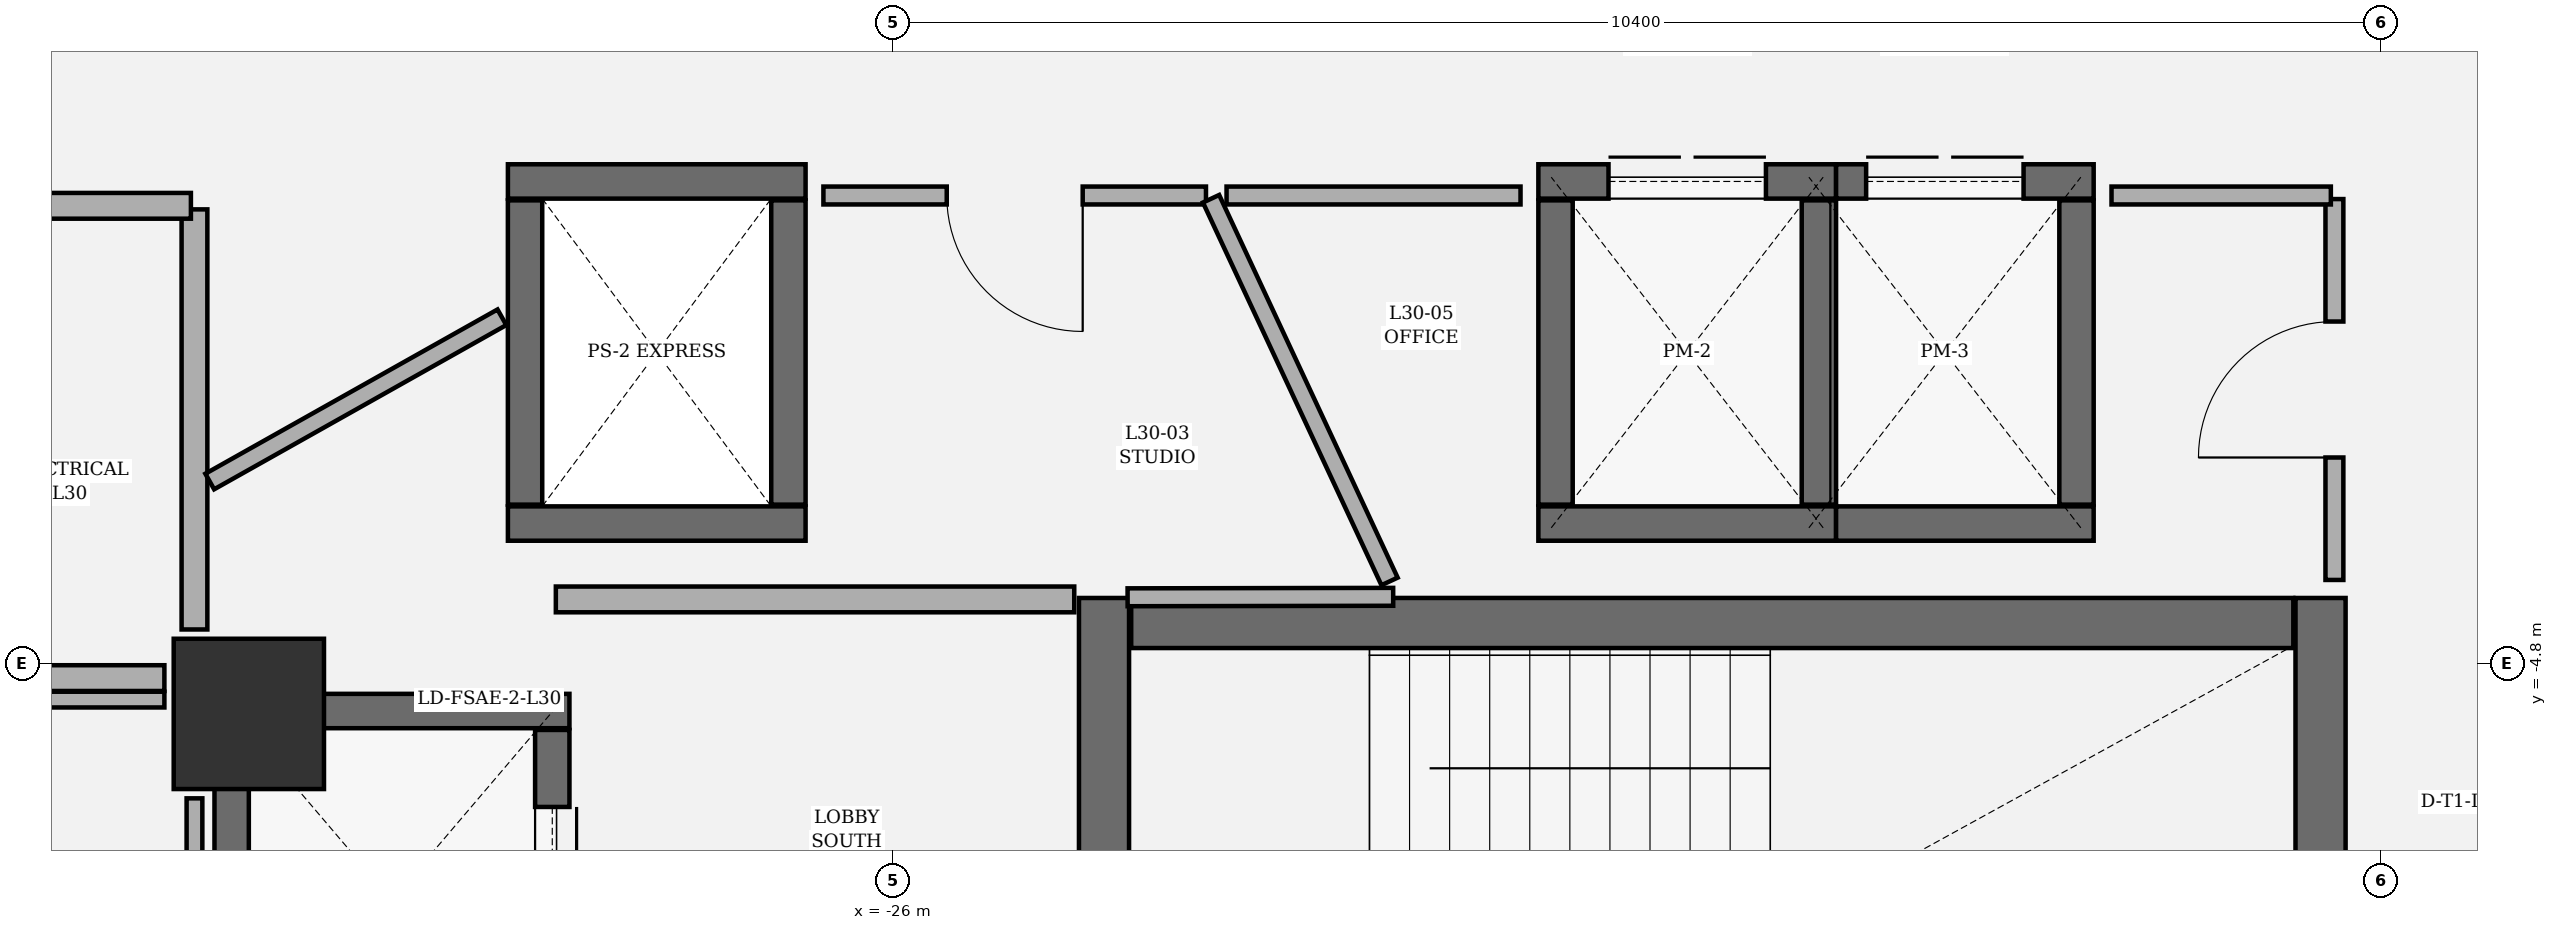
"""IFC4 building model, lengths in metres.
Left out: names, types, materials, properties, quantities, classifications, styles, units other than length and angle.
Written with IfcOpenShell. Run it as: python <this file> out.ifc"""

import sys

from ifc_helpers import new_model, si_unit, direction, frame, frame_2d, origin, origin_2d, place, context, subcontext, project, spatial, rectangle, extrude, element, fill, save


model = new_model("IFC4")
c1 = context("Model", 3, precision=1e-05, world=origin(), true_north=direction((0.0, 1.0)))
c2 = subcontext(c1, "Body", "Model", "MODEL_VIEW")
j1 = project(units=[si_unit("LENGTHUNIT", "METRE"), si_unit("PLANEANGLEUNIT", "RADIAN")], contexts=[c1])
p1 = place(None, origin())
s1 = spatial("IfcSite", under=j1, at=p1, CompositionType="ELEMENT")
p2 = place(p1, origin())
s2 = spatial("IfcBuilding", under=s1, at=p2, CompositionType="ELEMENT")
p3 = place(p2, frame((0.0, 0.0, 134.1)))
s3 = spatial("IfcBuildingStorey", under=s2, at=p3, CompositionType="ELEMENT", Elevation=134.1)
p4 = place(p3, frame((-30.5, -5.15, 0.0), z_axis=(0.0, 0.0, 1.0), x_axis=(1.0, 0.0, 0.0)))
e1 = element("IfcColumn", 1, at=p4, inside=s3, PredefinedType="COLUMN", context=c2, shape_type="SweptSolid", body=[
    extrude(rectangle(XDim=1.05, YDim=1.05, at=origin_2d()), origin(), (0.0, 0.0, 1.0), 4.05),
])
for number, where, z_axis, x_axis in (
    (2, (-24.525, -4.34, 0.0), (0.0, 0.0, 1.0), (0.0, -1.0, 0.0)),
    (3, (-16.025, -8.55, 0.0), (0.0, 0.0, 1.0), (0.0, 1.0, 0.0)),
):
    element("IfcWall", number, at=place(p3, frame(where, z_axis=z_axis, x_axis=x_axis)), inside=s3, PredefinedType="SHEAR", context=c2, shape_type="SweptSolid", body=[
        extrude(rectangle(XDim=4.21, YDim=0.35, at=frame_2d((2.105, 0.0))), origin(), (0.0, 0.0, 1.0), 3.78),
    ])
p5 = place(p3, frame((-16.215, -4.515, 0.0), z_axis=(0.0, 0.0, 1.0), x_axis=(-1.0, 0.0, 0.0)))
e4 = element("IfcWall", 4, at=p5, inside=s3, PredefinedType="SHEAR", context=c2, shape_type="SweptSolid", body=[
    extrude(rectangle(XDim=8.12, YDim=0.35, at=frame_2d((4.06, 0.0))), origin(), (0.0, 0.0, 1.0), 3.78),
])
p6 = place(p3, frame((-30.74, -5.13, 0.0), z_axis=(0.0, 0.0, 1.0), x_axis=(1.0, 0.0, 0.0)))
e5 = element("IfcWall", 5, at=p6, inside=s3, PredefinedType="SHEAR", context=c2, shape_type="SweptSolid", body=[
    extrude(rectangle(XDim=2.48, YDim=0.24, at=frame_2d((1.24, 0.0))), origin(), (0.0, 0.0, 1.0), 3.78),
])
p7 = place(p3, frame((-30.62, -7.638, 0.0), z_axis=(0.0, 0.0, 1.0), x_axis=(0.0, 1.0, 0.0)))
e6 = element("IfcWall", 6, at=p7, inside=s3, PredefinedType="SHEAR", context=c2, shape_type="SweptSolid", body=[
    extrude(rectangle(XDim=2.376, YDim=0.24, at=frame_2d((1.188, 0.0))), origin(), (0.0, 0.0, 1.0), 3.78),
])
p8 = place(p3, frame((-28.38, -5.262, 0.0), z_axis=(0.0, 0.0, 1.0), x_axis=(0.0, -1.0, 0.0)))
e7 = element("IfcWall", 7, at=p8, inside=s3, PredefinedType="SHEAR", context=c2, shape_type="SweptSolid", body=[
    extrude(rectangle(XDim=2.376, YDim=0.24, at=frame_2d((1.188, 0.0))), origin(), (0.0, 0.0, 1.0), 3.78),
])
p9 = place(p8, frame((0.538, 0.0, 0.0)))
e8 = element("IfcOpeningElement", 8, at=p9, cuts=e7, PredefinedType="OPENING", context=c2, shape_type="SweptSolid", body=[
    extrude(rectangle(XDim=1.3, YDim=2.3, at=frame_2d((0.65, 1.15))), frame((0.0, 0.13, 0.0), z_axis=(0.0, -1.0, 0.0), x_axis=(1.0, 0.0, 0.0)), (0.0, 0.0, 1.0), 0.26),
])
for number, where, z_axis, x_axis in (
    (9, (-26.61, -3.82, 0.0), (0.0, 0.0, 1.0), (-1.0, 0.0, 0.0)),
    (10, (-28.69, -1.43, 0.0), (0.0, 0.0, 1.0), (1.0, 0.0, 0.0)),
):
    element("IfcWall", number, at=place(p3, frame(where, z_axis=z_axis, x_axis=x_axis)), inside=s3, PredefinedType="SHEAR", context=c2, shape_type="SweptSolid", body=[
        extrude(rectangle(XDim=2.08, YDim=0.24, at=frame_2d((1.04, 0.0))), origin(), (0.0, 0.0, 1.0), 3.78),
    ])
for number, where, z_axis, x_axis in (
    (11, (-28.57, -3.688, 0.0), (0.0, 0.0, 1.0), (0.0, 1.0, 0.0)),
    (12, (-26.73, -1.562, 0.0), (0.0, 0.0, 1.0), (0.0, -1.0, 0.0)),
):
    element("IfcWall", number, at=place(p3, frame(where, z_axis=z_axis, x_axis=x_axis)), inside=s3, PredefinedType="SHEAR", context=c2, shape_type="SweptSolid", body=[
        extrude(rectangle(XDim=2.126, YDim=0.24, at=frame_2d((1.063, 0.0))), origin(), (0.0, 0.0, 1.0), 3.78),
    ])
p10 = place(p3, frame((-19.41, -3.82, 0.0), z_axis=(0.0, 0.0, 1.0), x_axis=(-1.0, 0.0, 0.0)))
e13 = element("IfcWall", 13, at=p10, inside=s3, PredefinedType="SHEAR", context=c2, shape_type="SweptSolid", body=[
    extrude(rectangle(XDim=2.08, YDim=0.24, at=frame_2d((1.04, 0.0))), origin(), (0.0, 0.0, 1.0), 3.78),
])
p11 = place(p3, frame((-21.49, -1.43, 0.0), z_axis=(0.0, 0.0, 1.0), x_axis=(1.0, 0.0, 0.0)))
e14 = element("IfcWall", 14, at=p11, inside=s3, PredefinedType="SHEAR", context=c2, shape_type="SweptSolid", body=[
    extrude(rectangle(XDim=2.08, YDim=0.24, at=frame_2d((1.04, 0.0))), origin(), (0.0, 0.0, 1.0), 3.78),
])
p12 = place(p11, frame((0.49, 0.0, 0.0)))
e15 = element("IfcOpeningElement", 15, at=p12, cuts=e14, PredefinedType="OPENING", context=c2, shape_type="SweptSolid", body=[
    extrude(rectangle(XDim=1.1, YDim=2.2, at=frame_2d((0.55, 1.1))), frame((0.0, 0.13, 0.0), z_axis=(0.0, -1.0, 0.0), x_axis=(1.0, 0.0, 0.0)), (0.0, 0.0, 1.0), 0.26),
])
for number, where, z_axis, x_axis in (
    (16, (-21.37, -3.688, 0.0), (0.0, 0.0, 1.0), (0.0, 1.0, 0.0)),
    (17, (-19.53, -1.562, 0.0), (0.0, 0.0, 1.0), (0.0, -1.0, 0.0)),
):
    element("IfcWall", number, at=place(p3, frame(where, z_axis=z_axis, x_axis=x_axis)), inside=s3, PredefinedType="SHEAR", context=c2, shape_type="SweptSolid", body=[
        extrude(rectangle(XDim=2.126, YDim=0.24, at=frame_2d((1.063, 0.0))), origin(), (0.0, 0.0, 1.0), 3.78),
    ])
p13 = place(p3, frame((-17.61, -3.82, 0.0), z_axis=(0.0, 0.0, 1.0), x_axis=(-1.0, 0.0, 0.0)))
e18 = element("IfcWall", 18, at=p13, inside=s3, PredefinedType="SHEAR", context=c2, shape_type="SweptSolid", body=[
    extrude(rectangle(XDim=1.8, YDim=0.24, at=frame_2d((0.9, 0.0))), origin(), (0.0, 0.0, 1.0), 3.78),
])
p14 = place(p3, frame((-19.41, -1.43, 0.0), z_axis=(0.0, 0.0, 1.0), x_axis=(1.0, 0.0, 0.0)))
e19 = element("IfcWall", 19, at=p14, inside=s3, PredefinedType="SHEAR", context=c2, shape_type="SweptSolid", body=[
    extrude(rectangle(XDim=1.8, YDim=0.24, at=frame_2d((0.9, 0.0))), origin(), (0.0, 0.0, 1.0), 3.78),
])
p15 = place(p14, frame((0.21, 0.0, 0.0)))
e20 = element("IfcOpeningElement", 20, at=p15, cuts=e19, PredefinedType="OPENING", context=c2, shape_type="SweptSolid", body=[
    extrude(rectangle(XDim=1.1, YDim=2.2, at=frame_2d((0.55, 1.1))), frame((0.0, 0.13, 0.0), z_axis=(0.0, -1.0, 0.0), x_axis=(1.0, 0.0, 0.0)), (0.0, 0.0, 1.0), 0.26),
])
p16 = place(p3, frame((-17.73, -1.562, 0.0), z_axis=(0.0, 0.0, 1.0), x_axis=(0.0, -1.0, 0.0)))
e21 = element("IfcWall", 21, at=p16, inside=s3, PredefinedType="SHEAR", context=c2, shape_type="SweptSolid", body=[
    extrude(rectangle(XDim=2.126, YDim=0.24, at=frame_2d((1.063, 0.0))), origin(), (0.0, 0.0, 1.0), 3.78),
])
p17 = place(p3, frame((-24.733, -4.35, 0.0), z_axis=(0.0, 0.0, 1.0), x_axis=(-1.0, 0.0, 0.0)))
e22 = element("IfcWall", 22, at=p17, inside=s3, PredefinedType="PARTITIONING", context=c2, shape_type="SweptSolid", body=[
    extrude(rectangle(XDim=3.622, YDim=0.18, at=frame_2d((1.811, 0.0))), origin(), (0.0, 0.0, 1.0), 3.78),
])
p18 = place(p3, frame((-30.88, -7.743, 0.0), z_axis=(0.0, 0.0, 1.0), x_axis=(0.0, 1.0, 0.0)))
e23 = element("IfcWall", 23, at=p18, inside=s3, PredefinedType="PARTITIONING", context=c2, shape_type="SweptSolid", body=[
    extrude(rectangle(XDim=2.003, YDim=0.11, at=frame_2d((1.001, 0.0))), origin(), (0.0, 0.0, 1.0), 3.78),
])
p19 = place(p3, frame((-31.09, -5.05, 0.0), z_axis=(0.0, 0.0, 1.0), x_axis=(-1.0, 0.0, 0.0)))
e24 = element("IfcWall", 24, at=p19, inside=s3, PredefinedType="PARTITIONING", context=c2, shape_type="SweptSolid", body=[
    extrude(rectangle(XDim=3.065, YDim=0.11, at=frame_2d((1.532, 0.0))), origin(), (0.0, 0.0, 1.0), 3.78),
])
p20 = place(p3, frame((-34.155, -4.9, 0.0), z_axis=(0.0, 0.0, 1.0), x_axis=(1.0, 0.0, 0.0)))
e25 = element("IfcWall", 25, at=p20, inside=s3, PredefinedType="PARTITIONING", context=c2, shape_type="SweptSolid", body=[
    extrude(rectangle(XDim=3.065, YDim=0.18, at=frame_2d((1.532, 0.0))), origin(), (0.0, 0.0, 1.0), 3.78),
])
p21 = place(p3, frame((-30.88, -4.56, 0.0), z_axis=(0.0, 0.0, 1.0), x_axis=(0.0, 1.0, 0.0)))
e26 = element("IfcWall", 26, at=p21, inside=s3, PredefinedType="PARTITIONING", context=c2, shape_type="SweptSolid", body=[
    extrude(rectangle(XDim=2.935, YDim=0.18, at=frame_2d((1.468, 0.0))), origin(), (0.0, 0.0, 1.0), 3.78),
])
p22 = place(p3, frame((-30.905, -1.6, 0.0), z_axis=(0.0, 0.0, 1.0), x_axis=(-1.0, 0.0, 0.0)))
e27 = element("IfcWall", 27, at=p22, inside=s3, PredefinedType="PARTITIONING", context=c2, shape_type="SweptSolid", body=[
    extrude(rectangle(XDim=3.25, YDim=0.18, at=frame_2d((1.625, 0.0))), origin(), (0.0, 0.0, 1.0), 3.78),
])
p23 = place(p22, frame((1.185, 0.0, 0.0)))
e28 = element("IfcOpeningElement", 28, at=p23, cuts=e27, PredefinedType="OPENING", context=c2, shape_type="SweptSolid", body=[
    extrude(rectangle(XDim=0.88, YDim=2.1, at=frame_2d((0.44, 1.05))), frame((0.0, 0.1, 0.0), z_axis=(0.0, -1.0, 0.0), x_axis=(1.0, 0.0, 0.0)), (0.0, 0.0, 1.0), 0.2),
])
p24 = place(p3, frame((-23.812, -1.528, 0.0), z_axis=(0.0, 0.0, 1.0), x_axis=(-1.0, 0.0, 0.0)))
e29 = element("IfcWall", 29, at=p24, inside=s3, PredefinedType="PARTITIONING", context=c2, shape_type="SweptSolid", body=[
    extrude(rectangle(XDim=2.673, YDim=0.125, at=frame_2d((1.336, 0.0))), origin(), (0.0, 0.0, 1.0), 3.78),
])
p25 = place(p24, frame((0.861, 0.0, 0.0)))
e30 = element("IfcOpeningElement", 30, at=p25, cuts=e29, PredefinedType="OPENING", context=c2, shape_type="SweptSolid", body=[
    extrude(rectangle(XDim=0.95, YDim=2.15, at=frame_2d((0.475, 1.075))), frame((0.0, 0.073, 0.0), z_axis=(0.0, -1.0, 0.0), x_axis=(1.0, 0.0, 0.0)), (0.0, 0.0, 1.0), 0.145),
])
p26 = place(p3, frame((-28.732, -2.379, 0.0), z_axis=(0.0, 0.0, 1.0), x_axis=(-0.871711937641, -0.490018670842, 0.0)))
e31 = element("IfcWall", 31, at=p26, inside=s3, PredefinedType="PARTITIONING", context=c2, shape_type="SweptSolid", body=[
    extrude(rectangle(XDim=2.342, YDim=0.125, at=frame_2d((1.171, 0.0))), origin(), (0.0, 0.0, 1.0), 3.78),
])
p27 = place(p3, frame((-24.36, -4.335, 0.0), z_axis=(0.0, 0.0, 1.0), x_axis=(0.999998537438, 0.001710298775, 0.0)))
e32 = element("IfcWall", 32, at=p27, inside=s3, PredefinedType="PARTITIONING", context=c2, shape_type="SweptSolid", body=[
    extrude(rectangle(XDim=1.856, YDim=0.125, at=frame_2d((0.928, 0.0))), origin(), (0.0, 0.0, 1.0), 3.78),
])
p28 = place(p3, frame((-22.53, -4.224, 0.0), z_axis=(0.0, 0.0, 1.0), x_axis=(-0.422717831819, 0.906261350088, 0.0)))
e33 = element("IfcWall", 33, at=p28, inside=s3, PredefinedType="PARTITIONING", context=c2, shape_type="SweptSolid", body=[
    extrude(rectangle(XDim=2.95, YDim=0.125, at=frame_2d((1.475, 0.0))), origin(), (0.0, 0.0, 1.0), 3.78),
])
p29 = place(p3, frame((-15.928, -4.214, 0.0), z_axis=(0.0, 0.0, 1.0), x_axis=(0.0, 1.0, 0.0)))
e34 = element("IfcWall", 34, at=p29, inside=s3, PredefinedType="PARTITIONING", context=c2, shape_type="SweptSolid", body=[
    extrude(rectangle(XDim=2.661, YDim=0.125, at=frame_2d((1.331, 0.0))), origin(), (0.0, 0.0, 1.0), 3.78),
])
p30 = place(p29, frame((0.855, 0.0, 0.0)))
e35 = element("IfcOpeningElement", 35, at=p30, cuts=e34, PredefinedType="OPENING", context=c2, shape_type="SweptSolid", body=[
    extrude(rectangle(XDim=0.95, YDim=2.15, at=frame_2d((0.475, 1.075))), frame((0.0, 0.073, 0.0), z_axis=(0.0, -1.0, 0.0), x_axis=(1.0, 0.0, 0.0)), (0.0, 0.0, 1.0), 0.145),
])
p31 = place(p3, frame((-15.953, -1.528, 0.0), z_axis=(0.0, 0.0, 1.0), x_axis=(-1.0, 0.0, 0.0)))
e36 = element("IfcWall", 36, at=p31, inside=s3, PredefinedType="PARTITIONING", context=c2, shape_type="SweptSolid", body=[
    extrude(rectangle(XDim=1.532, YDim=0.125, at=frame_2d((0.766, 0.0))), origin(), (0.0, 0.0, 1.0), 3.78),
])
p32 = place(p3, frame((-21.615, -1.528, 0.0), z_axis=(0.0, 0.0, 1.0), x_axis=(-1.0, 0.0, 0.0)))
e37 = element("IfcWall", 37, at=p32, inside=s3, PredefinedType="PARTITIONING", context=c2, shape_type="SweptSolid", body=[
    extrude(rectangle(XDim=2.054, YDim=0.125, at=frame_2d((1.027, 0.0))), origin(), (0.0, 0.0, 1.0), 3.78),
])
p33 = place(p9, origin())
e38 = element("IfcDoor", 38, at=p33, inside=s3, OperationType="DOUBLE_DOOR_SLIDING", PredefinedType="DOOR", context=c2, shape_type="SweptSolid", body=[
    extrude(rectangle(XDim=1.3, YDim=2.3, at=frame_2d((0.65, 1.15))), frame((0.0, 0.025, 0.0), z_axis=(0.0, -1.0, 0.0), x_axis=(1.0, 0.0, 0.0)), (0.0, 0.0, 1.0), 0.05),
])
fill(e8, e38)
p34 = place(p12, origin())
e39 = element("IfcDoor", 39, at=p34, inside=s3, OperationType="DOUBLE_DOOR_SLIDING", PredefinedType="DOOR", context=c2, shape_type="SweptSolid", body=[
    extrude(rectangle(XDim=1.1, YDim=2.2, at=frame_2d((0.55, 1.1))), frame((0.0, 0.025, 0.0), z_axis=(0.0, -1.0, 0.0), x_axis=(1.0, 0.0, 0.0)), (0.0, 0.0, 1.0), 0.05),
])
fill(e15, e39)
p35 = place(p15, origin())
e40 = element("IfcDoor", 40, at=p35, inside=s3, OperationType="DOUBLE_DOOR_SLIDING", PredefinedType="DOOR", context=c2, shape_type="SweptSolid", body=[
    extrude(rectangle(XDim=1.1, YDim=2.2, at=frame_2d((0.55, 1.1))), frame((0.0, 0.025, 0.0), z_axis=(0.0, -1.0, 0.0), x_axis=(1.0, 0.0, 0.0)), (0.0, 0.0, 1.0), 0.05),
])
fill(e20, e40)
p36 = place(p25, origin())
e41 = element("IfcDoor", 41, at=p36, inside=s3, OperationType="SINGLE_SWING_LEFT", PredefinedType="DOOR", context=c2, shape_type="SweptSolid", body=[
    extrude(rectangle(XDim=0.95, YDim=2.15, at=frame_2d((0.475, 1.075))), frame((0.0, 0.025, 0.0), z_axis=(0.0, -1.0, 0.0), x_axis=(1.0, 0.0, 0.0)), (0.0, 0.0, 1.0), 0.05),
])
fill(e30, e41)
p37 = place(p30, origin())
e42 = element("IfcDoor", 42, at=p37, inside=s3, OperationType="SINGLE_SWING_LEFT", PredefinedType="DOOR", context=c2, shape_type="SweptSolid", body=[
    extrude(rectangle(XDim=0.95, YDim=2.15, at=frame_2d((0.475, 1.075))), frame((0.0, 0.025, 0.0), z_axis=(0.0, -1.0, 0.0), x_axis=(1.0, 0.0, 0.0)), (0.0, 0.0, 1.0), 0.05),
])
fill(e35, e42)
save(model, sys.argv[1])
